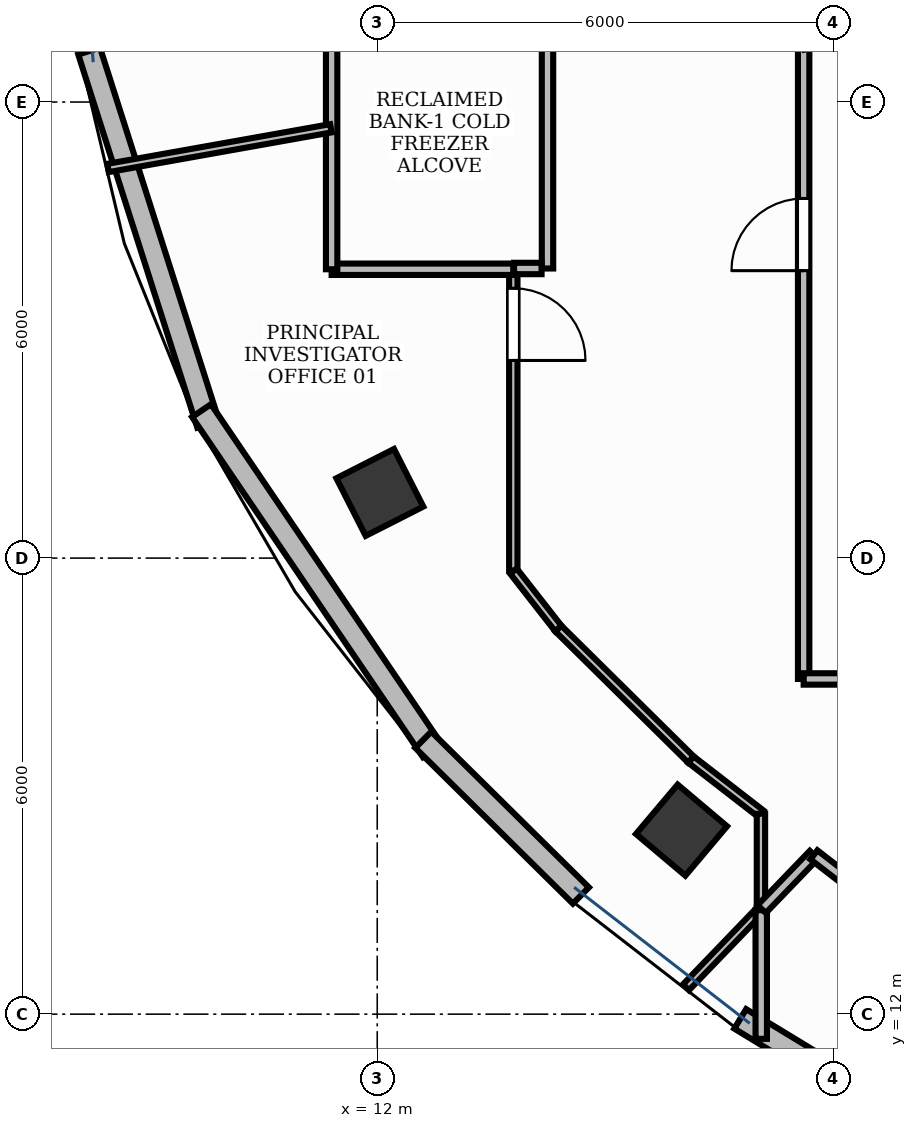
"""IFC4 building model, lengths in metres.
Left out: names, types, materials, properties, quantities, classifications, styles, units other than length and angle.
Written with IfcOpenShell. Run it as: python <this file> out.ifc"""

import sys

from ifc_helpers import new_model, si_unit, direction, frame, frame_2d, origin, origin_2d, place, context, subcontext, project, spatial, rectangle, extrude, element, fill, save


model = new_model("IFC4")
c1 = context("Model", 3, precision=1e-05, world=origin(), true_north=direction((0.0, 1.0)))
c2 = subcontext(c1, "Body", "Model", "MODEL_VIEW")
j1 = project(units=[si_unit("LENGTHUNIT", "METRE"), si_unit("PLANEANGLEUNIT", "RADIAN")], contexts=[c1])
p1 = place(None, origin())
s1 = spatial("IfcSite", under=j1, at=p1, CompositionType="ELEMENT")
p2 = place(p1, origin())
s2 = spatial("IfcBuilding", under=s1, at=p2, CompositionType="ELEMENT")
p3 = place(p2, frame((0.0, 0.0, 264.6)))
s3 = spatial("IfcBuildingStorey", under=s2, at=p3, CompositionType="ELEMENT", Elevation=264.6)
for number, where, z_axis, x_axis in (
    (1, (12.034, 18.864, -0.0), (0.0, 0.0, 1.0), (-0.453, 0.891, 0.0)),
    (2, (16.003, 14.421, -0.0), (0.0, 0.0, 1.0), (-0.764, 0.645, 0.0)),
):
    element("IfcColumn", number, at=place(p3, frame(where, z_axis=z_axis, x_axis=x_axis)), inside=s3, PredefinedType="COLUMN", context=c2, shape_type="SweptSolid", body=[
        extrude(rectangle(XDim=0.85, YDim=0.85, at=origin_2d()), origin(), (0.0, 0.0, 1.0), 3.901),
    ])
p4 = place(p3, frame((8.21, 24.67, 0.0), z_axis=(0.0, 0.0, 1.0), x_axis=(0.303876387353, -0.952711467974, 0.0)))
e3 = element("IfcWall", 3, at=p4, inside=s3, PredefinedType="STANDARD", context=c2, shape_type="SweptSolid", body=[
    extrude(rectangle(XDim=5.152, YDim=0.3, at=frame_2d((2.576, 0.0))), origin(), (0.0, 0.0, 1.0), 3.9),
])
p5 = place(p3, frame((9.689, 19.94, 0.0), z_axis=(0.0, 0.0, 1.0), x_axis=(0.561547791281, -0.827444305139, 0.0)))
e4 = element("IfcWall", 4, at=p5, inside=s3, PredefinedType="STANDARD", context=c2, shape_type="SweptSolid", body=[
    extrude(rectangle(XDim=5.407, YDim=0.3, at=frame_2d((2.704, 0.0))), origin(), (0.0, 0.0, 1.0), 3.47),
])
p6 = place(p3, frame((12.606, 15.61, 0.0), z_axis=(0.0, 0.0, 1.0), x_axis=(0.711366092533, -0.702821657602, 0.0)))
e5 = element("IfcWall", 5, at=p6, inside=s3, PredefinedType="STANDARD", context=c2, shape_type="SweptSolid", body=[
    extrude(rectangle(XDim=2.915, YDim=0.3, at=frame_2d((1.457, 0.0))), origin(), (0.0, 0.0, 1.0), 3.47),
])
p7 = place(p3, frame((16.776, 11.938, 0.0), z_axis=(0.0, 0.0, 1.0), x_axis=(0.854500616392, -0.519450379329, 0.0)))
e6 = element("IfcWall", 6, at=p7, inside=s3, PredefinedType="STANDARD", context=c2, shape_type="SweptSolid", body=[
    extrude(rectangle(XDim=3.089, YDim=0.3, at=frame_2d((1.544, 0.0))), origin(), (0.0, 0.0, 1.0), 3.9),
])
p8 = place(p3, frame((14.24, 26.8, 0.0), z_axis=(0.0, 0.0, 1.0), x_axis=(0.0, -1.0, 0.0)))
e7 = element("IfcWall", 7, at=p8, inside=s3, PredefinedType="PARTITIONING", context=c2, shape_type="SweptSolid", body=[
    extrude(rectangle(XDim=4.99, YDim=0.15, at=frame_2d((2.495, 0.0))), origin(), (0.0, 0.0, 1.0), 2.91),
])
p9 = place(p8, frame((0.24, 0.0, 0.0)))
e8 = element("IfcOpeningElement", 8, at=p9, cuts=e7, PredefinedType="OPENING", context=c2, shape_type="SweptSolid", body=[
    extrude(rectangle(XDim=0.95, YDim=2.15, at=frame_2d((0.475, 1.075))), frame((0.0, 0.09, 0.0), z_axis=(0.0, -1.0, 0.0), x_axis=(1.0, 0.0, 0.0)), (0.0, 0.0, 1.0), 0.18),
])
p10 = place(p3, frame((13.79, 21.79, 0.0), z_axis=(0.0, 0.0, 1.0), x_axis=(0.0, -1.0, 0.0)))
e9 = element("IfcWall", 9, at=p10, inside=s3, PredefinedType="MOVABLE", context=c2, shape_type="SweptSolid", body=[
    extrude(rectangle(XDim=3.955, YDim=0.11, at=frame_2d((1.978, 0.0))), origin(), (0.0, 0.0, 1.0), 2.91),
])
p11 = place(p10, frame((0.24, 0.0, 0.0)))
e10 = element("IfcOpeningElement", 10, at=p11, cuts=e9, PredefinedType="OPENING", context=c2, shape_type="SweptSolid", body=[
    extrude(rectangle(XDim=0.95, YDim=2.15, at=frame_2d((0.475, 1.075))), frame((0.0, 0.07, 0.0), z_axis=(0.0, -1.0, 0.0), x_axis=(1.0, 0.0, 0.0)), (0.0, 0.0, 1.0), 0.14),
])
p12 = place(p3, frame((17.61, 16.41, 0.0), z_axis=(0.0, 0.0, 1.0), x_axis=(0.0, 1.0, 0.0)))
e11 = element("IfcWall", 11, at=p12, inside=s3, PredefinedType="PARTITIONING", context=c2, shape_type="SweptSolid", body=[
    extrude(rectangle(XDim=8.353, YDim=0.15, at=frame_2d((4.176, 0.0))), origin(), (0.0, 0.0, 1.0), 2.91),
])
p13 = place(p12, frame((5.371, 0.0, 0.0)))
e12 = element("IfcOpeningElement", 12, at=p13, cuts=e11, PredefinedType="OPENING", context=c2, shape_type="SweptSolid", body=[
    extrude(rectangle(XDim=0.95, YDim=2.15, at=frame_2d((0.475, 1.075))), frame((0.0, 0.09, 0.0), z_axis=(0.0, -1.0, 0.0), x_axis=(1.0, 0.0, 0.0)), (0.0, 0.0, 1.0), 0.18),
])
p14 = place(p3, frame((14.162, 21.81, 0.0), z_axis=(0.0, 0.0, 1.0), x_axis=(-1.0, 0.0, 0.0)))
e13 = element("IfcWall", 13, at=p14, inside=s3, PredefinedType="PARTITIONING", context=c2, shape_type="SweptSolid", body=[
    extrude(rectangle(XDim=0.362, YDim=0.15, at=frame_2d((0.181, 0.0))), origin(), (0.0, 0.0, 1.0), 2.91),
])
p15 = place(p3, frame((13.79, 21.8, 0.0), z_axis=(0.0, 0.0, 1.0), x_axis=(-1.0, 0.0, 0.0)))
e14 = element("IfcWall", 14, at=p15, inside=s3, PredefinedType="PARTITIONING", context=c2, shape_type="SweptSolid", body=[
    extrude(rectangle(XDim=2.39, YDim=0.15, at=frame_2d((1.195, 0.0))), origin(), (0.0, 0.0, 1.0), 2.91),
])
p16 = place(p3, frame((11.4, 21.8, 0.0), z_axis=(0.0, 0.0, 1.0), x_axis=(0.0, 1.0, 0.0)))
e15 = element("IfcWall", 15, at=p16, inside=s3, PredefinedType="PARTITIONING", context=c2, shape_type="SweptSolid", body=[
    extrude(rectangle(XDim=5.0, YDim=0.15, at=frame_2d((2.5, 0.0))), origin(), (0.0, 0.0, 1.0), 2.91),
])
p17 = place(p3, frame((8.458, 23.132, 0.0), z_axis=(0.0, 0.0, 1.0), x_axis=(0.984502480413, 0.175370653365, 0.0)))
e16 = element("IfcWall", 16, at=p17, inside=s3, PredefinedType="MOVABLE", context=c2, shape_type="SweptSolid", body=[
    extrude(rectangle(XDim=2.978, YDim=0.11, at=frame_2d((1.489, 0.0))), origin(), (0.0, 0.0, 1.0), 2.91),
])
p18 = place(p3, frame((13.792, 17.829, 0.0), z_axis=(0.0, 0.0, 1.0), x_axis=(0.615841557122, -0.787870025145, 0.0)))
e17 = element("IfcWall", 17, at=p18, inside=s3, PredefinedType="MOVABLE", context=c2, shape_type="SweptSolid", body=[
    extrude(rectangle(XDim=0.959, YDim=0.11, at=frame_2d((0.48, 0.0))), origin(), (0.0, 0.0, 1.0), 2.91),
])
p19 = place(p3, frame((14.384, 17.073, 0.0), z_axis=(0.0, 0.0, 1.0), x_axis=(0.711327015195, -0.702861207817, 0.0)))
e18 = element("IfcWall", 18, at=p19, inside=s3, PredefinedType="MOVABLE", context=c2, shape_type="SweptSolid", body=[
    extrude(rectangle(XDim=2.451, YDim=0.11, at=frame_2d((1.226, 0.0))), origin(), (0.0, 0.0, 1.0), 2.91),
])
p20 = place(p3, frame((16.128, 15.349, 0.0), z_axis=(0.0, 0.0, 1.0), x_axis=(0.790536936783, -0.612414362651, 0.0)))
e19 = element("IfcWall", 19, at=p20, inside=s3, PredefinedType="MOVABLE", context=c2, shape_type="SweptSolid", body=[
    extrude(rectangle(XDim=1.164, YDim=0.11, at=frame_2d((0.582, 0.0))), origin(), (0.0, 0.0, 1.0), 2.91),
])
p21 = place(p3, frame((17.048, 14.636, 0.0), z_axis=(0.0, 0.0, 1.0), x_axis=(0.0, -1.0, 0.0)))
e20 = element("IfcWall", 20, at=p21, inside=s3, PredefinedType="MOVABLE", context=c2, shape_type="SweptSolid", body=[
    extrude(rectangle(XDim=1.258, YDim=0.11, at=frame_2d((0.629, 0.0))), origin(), (0.0, 0.0, 1.0), 2.91),
])
p22 = place(p3, frame((17.048, 13.378, 0.0), z_axis=(0.0, 0.0, 1.0), x_axis=(-0.693410652624, -0.720542619716, 0.0)))
e21 = element("IfcWall", 21, at=p22, inside=s3, PredefinedType="MOVABLE", context=c2, shape_type="SweptSolid", body=[
    extrude(rectangle(XDim=1.422, YDim=0.11, at=frame_2d((0.711, 0.0))), origin(), (0.0, 0.0, 1.0), 2.91),
])
p23 = place(p3, frame((19.966, 16.41, 0.0), z_axis=(0.0, 0.0, 1.0), x_axis=(-1.0, 0.0, 0.0)))
e22 = element("IfcWall", 22, at=p23, inside=s3, PredefinedType="PARTITIONING", context=c2, shape_type="SweptSolid", body=[
    extrude(rectangle(XDim=2.356, YDim=0.15, at=frame_2d((1.178, 0.0))), origin(), (0.0, 0.0, 1.0), 2.91),
])
p24 = place(p3, frame((17.052, 11.675, 0.0), z_axis=(0.0, 0.0, 1.0), x_axis=(0.0, 1.0, 0.0)))
e23 = element("IfcWall", 23, at=p24, inside=s3, PredefinedType="PARTITIONING", context=c2, shape_type="SweptSolid", body=[
    extrude(rectangle(XDim=1.693, YDim=0.15, at=frame_2d((0.846, 0.0))), origin(), (0.0, 0.0, 1.0), 2.91),
])
p25 = place(p3, frame((17.058, 13.383, 0.0), z_axis=(0.0, 0.0, 1.0), x_axis=(0.693419009771, 0.720534577163, 0.0)))
e24 = element("IfcWall", 24, at=p25, inside=s3, PredefinedType="PARTITIONING", context=c2, shape_type="SweptSolid", body=[
    extrude(rectangle(XDim=0.99, YDim=0.15, at=frame_2d((0.495, 0.0))), origin(), (0.0, 0.0, 1.0), 2.91),
])
p26 = place(p3, frame((17.745, 14.096, 0.0), z_axis=(0.0, 0.0, 1.0), x_axis=(0.790478415243, -0.612489897904, 0.0)))
e25 = element("IfcWall", 25, at=p26, inside=s3, PredefinedType="PARTITIONING", context=c2, shape_type="SweptSolid", body=[
    extrude(rectangle(XDim=0.513, YDim=0.15, at=frame_2d((0.256, 0.0))), origin(), (0.0, 0.0, 1.0), 2.91),
])
p27 = place(p11, origin())
e26 = element("IfcDoor", 26, at=p27, inside=s3, OperationType="SINGLE_SWING_RIGHT", PredefinedType="DOOR", context=c2, shape_type="SweptSolid", body=[
    extrude(rectangle(XDim=0.95, YDim=2.15, at=frame_2d((0.475, 1.075))), frame((0.0, 0.025, 0.0), z_axis=(0.0, -1.0, 0.0), x_axis=(1.0, 0.0, 0.0)), (0.0, 0.0, 1.0), 0.05),
])
fill(e10, e26)
p28 = place(p13, origin())
e27 = element("IfcDoor", 27, at=p28, inside=s3, OperationType="SINGLE_SWING_LEFT", PredefinedType="DOOR", context=c2, shape_type="SweptSolid", body=[
    extrude(rectangle(XDim=0.95, YDim=2.15, at=frame_2d((0.475, 1.075))), frame((0.0, 0.025, 0.0), z_axis=(0.0, -1.0, 0.0), x_axis=(1.0, 0.0, 0.0)), (0.0, 0.0, 1.0), 0.05),
])
fill(e12, e27)
save(model, sys.argv[1])
